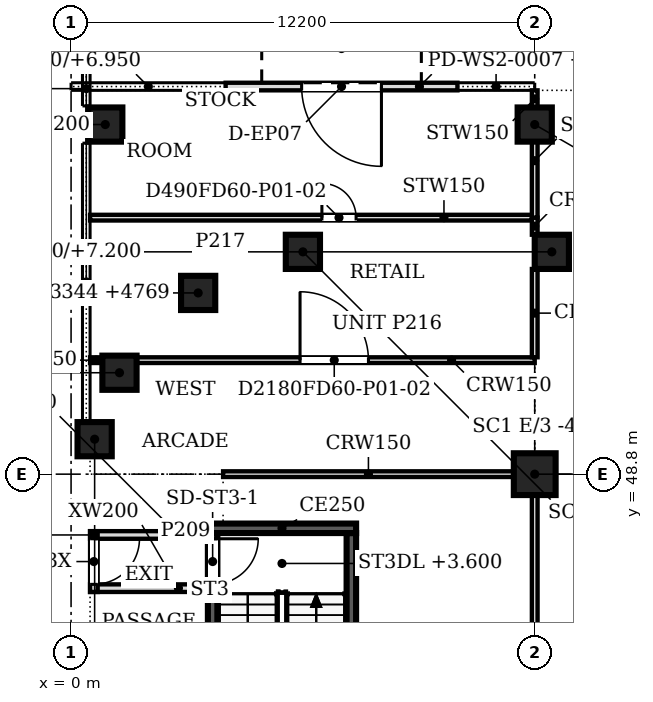
"""IFC4 building model, lengths in metres.
Left out: names, types, materials, properties, quantities, classifications, styles, units other than length and angle.
Written with IfcOpenShell. Run it as: python <this file> out.ifc"""

import sys

from ifc_helpers import new_model, si_unit, direction, frame, frame_2d, origin, origin_2d, place, context, subcontext, project, spatial, polyline, rectangle, outline, extrude, faceted_brep, source, transform, mapped, element, fill, save


model = new_model("IFC4")
c1 = context("Model", 3, precision=1e-05, world=origin(), true_north=direction((0.0, 1.0)))
c2 = subcontext(c1, "Body", "Model", "MODEL_VIEW")
j1 = project(units=[si_unit("LENGTHUNIT", "METRE"), si_unit("PLANEANGLEUNIT", "RADIAN")], contexts=[c1])
p1 = place(None, origin())
s1 = spatial("IfcSite", under=j1, at=p1, CompositionType="ELEMENT")
p2 = place(p1, origin())
s2 = spatial("IfcBuilding", under=s1, at=p2, CompositionType="ELEMENT")
p3 = place(p2, origin())
s3 = spatial("IfcBuildingStorey", under=s2, at=p3, CompositionType="ELEMENT", Elevation=0.0)
p4 = place(p3, frame((12.65, 54.65, 0.0), z_axis=(0.0, 0.0, 1.0), x_axis=(1.0, 0.0, 0.0)))
e1 = element("IfcColumn", 1, at=p4, inside=s3, PredefinedType="COLUMN", context=c2, shape_type="SweptSolid", body=[
    extrude(rectangle(XDim=0.9, YDim=0.9, at=origin_2d()), origin(), (0.0, 0.0, 1.0), 7.2),
])
for number, where, z_axis, x_axis in (
    (2, (6.1, 54.65, 0.0), (0.0, 0.0, 1.0), (1.0, 0.0, 0.0)),
    (3, (3.344, 53.569, 0.0), (0.0, 0.0, 1.0), (1.0, 0.0, 0.0)),
    (4, (1.274, 51.469, 0.0), (0.0, 0.0, 1.0), (1.0, 0.0, 0.0)),
):
    element("IfcColumn", number, at=place(p3, frame(where, z_axis=z_axis, x_axis=x_axis)), inside=s3, PredefinedType="COLUMN", context=c2, shape_type="SweptSolid", body=[
        extrude(rectangle(XDim=0.9, YDim=0.9, at=origin_2d()), origin(), (0.0, 0.0, 1.0), 6.95),
    ])
p5 = place(p3, frame((12.2, 48.8, 0.0), z_axis=(0.0, 0.0, 1.0), x_axis=(1.0, 0.0, 0.0)))
e5 = element("IfcColumn", 5, at=p5, inside=s3, PredefinedType="COLUMN", context=c2, shape_type="SweptSolid", body=[
    extrude(rectangle(XDim=1.1, YDim=1.1, at=origin_2d()), origin(), (0.0, 0.0, 1.0), 6.95),
])
for number, where, z_axis, x_axis in (
    (6, (12.2, 58.0, 0.0), (0.0, 0.0, 1.0), (1.0, 0.0, 0.0)),
    (7, (0.9, 58.0, 0.0), (0.0, 0.0, 1.0), (1.0, 0.0, 0.0)),
    (8, (0.62, 49.72, 0.0), (0.0, 0.0, 1.0), (1.0, 0.0, 0.0)),
):
    element("IfcColumn", number, at=place(p3, frame(where, z_axis=z_axis, x_axis=x_axis)), inside=s3, PredefinedType="COLUMN", context=c2, shape_type="SweptSolid", body=[
        extrude(rectangle(XDim=0.9, YDim=0.9, at=origin_2d()), origin(), (0.0, 0.0, 1.0), 6.95),
    ])
m1 = source(origin(), c2, "Body", "Brep", [
    faceted_brep([(0.0, -0.1, 0.0), (1.472, -0.1, 0.0), (1.472, -0.1, 6.383), (0.019, -0.1, 8.4), (0.0, -0.1, 8.373), (0.037, 0.1, 8.374), (1.472, 0.1, 6.383), (1.472, 0.1, 0.0), (0.037, 0.1, 0.0), (0.019, 0.0, 8.4)], [[[0, 1, 2, 3, 4]], [[5, 6, 7, 8]], [[8, 7, 1, 0]], [[7, 6, 2, 1]], [[6, 5, 9, 3, 2]], [[4, 3, 9]], [[8, 0, 4, 9, 5]]]),
])
p6 = place(p3, frame((0.25, 48.772, 0.0), z_axis=(0.0, 0.0, 1.0), x_axis=(0.0, -1.0, 0.0)))
e9 = element("IfcWall", 9, at=p6, inside=s3, PredefinedType="PARTITIONING", context=c2, shape_type="MappedRepresentation", body=[
    mapped(m1, transform((0.0, 0.0, 0.0), scale=1.0)),
])
m2 = source(origin(), c2, "Body", "SweptSolid", [
    extrude(outline(polyline([(0.219, 0.12), (1.352, 0.12), (1.352, 6.344), (0.219, 7.917), (0.219, 0.12)])), frame((0.0, 0.11, 0.0), z_axis=(0.0, -1.0, 0.0), x_axis=(1.0, 0.0, 0.0)), (0.0, 0.0, 1.0), 0.22),
])
p7 = place(p6, origin())
e10 = element("IfcOpeningElement", 10, at=p7, cuts=e9, PredefinedType="OPENING", context=c2, shape_type="MappedRepresentation", body=[
    mapped(m2, transform((0.0, 0.0, 0.0), scale=1.0)),
])
m3 = source(origin(), c2, "Body", "SweptSolid", [
    extrude(outline(polyline([(0.0, 0.0), (3.0, 0.0), (0.0, 4.163), (0.0, 0.0)])), frame((0.0, 0.1, 0.0), z_axis=(0.0, -1.0, 0.0), x_axis=(1.0, 0.0, 0.0)), (0.0, 0.0, 1.0), 0.2),
])
p8 = place(p3, frame((0.25, 45.7, 0.0), z_axis=(0.0, 0.0, 1.0), x_axis=(0.0, -1.0, 0.0)))
e11 = element("IfcWall", 11, at=p8, inside=s3, PredefinedType="PARTITIONING", context=c2, shape_type="MappedRepresentation", body=[
    mapped(m3, transform((0.0, 0.0, 0.0), scale=1.0)),
])
m4 = source(origin(), c2, "Body", "SweptSolid", [
    extrude(outline(polyline([(0.12, 0.12), (2.766, 0.12), (0.12, 3.791), (0.12, 0.12)])), frame((0.0, 0.11, 0.0), z_axis=(0.0, -1.0, 0.0), x_axis=(1.0, 0.0, 0.0)), (0.0, 0.0, 1.0), 0.22),
])
p9 = place(p8, origin())
e12 = element("IfcOpeningElement", 12, at=p9, cuts=e11, PredefinedType="OPENING", context=c2, shape_type="MappedRepresentation", body=[
    mapped(m4, transform((0.0, 0.0, 0.0), scale=1.0)),
])
m5 = source(origin(), c2, "Body", "SweptSolid", [
    extrude(outline(polyline([(1.6, 0.0), (1.6, 1.563), (0.0, 3.783), (0.0, 0.0), (1.6, 0.0)])), frame((0.0, 0.1, 0.0), z_axis=(0.0, -1.0, 0.0), x_axis=(1.0, 0.0, 0.0)), (0.0, 0.0, 1.0), 0.2),
])
p10 = place(p3, frame((0.25, 47.3, 2.6), z_axis=(0.0, 0.0, 1.0), x_axis=(0.0, -1.0, 0.0)))
e13 = element("IfcWall", 13, at=p10, inside=s3, PredefinedType="PARTITIONING", context=c2, shape_type="MappedRepresentation", body=[
    mapped(m5, transform((0.0, 0.0, 0.0), scale=1.0)),
])
m6 = source(origin(), c2, "Body", "SweptSolid", [
    extrude(outline(polyline([(1.48, 0.12), (1.48, 1.524), (0.12, 3.411), (0.12, 0.12), (1.48, 0.12)])), frame((0.0, 0.11, 0.0), z_axis=(0.0, -1.0, 0.0), x_axis=(1.0, 0.0, 0.0)), (0.0, 0.0, 1.0), 0.22),
])
p11 = place(p10, origin())
e14 = element("IfcOpeningElement", 14, at=p11, cuts=e13, PredefinedType="OPENING", context=c2, shape_type="MappedRepresentation", body=[
    mapped(m6, transform((0.0, 0.0, 0.0), scale=1.0)),
])
m7 = source(origin(), c2, "Body", "Brep", [
    faceted_brep([(0.0, -0.25, 8.4), (6.053, -0.25, 0.0), (6.053, -0.25, 0.851), (0.613, -0.25, 8.4), (0.613, 0.25, 8.4), (6.053, 0.25, 0.851), (6.053, 0.25, 0.0), (0.047, 0.25, 8.335), (0.047, 0.25, 8.4), (0.0, 0.0, 8.4)], [[[0, 1, 2, 3]], [[4, 5, 6, 7, 8]], [[7, 6, 1, 0, 9]], [[5, 4, 3, 2]], [[4, 8, 9, 0, 3]], [[7, 9, 8]], [[1, 6, 5, 2]]]),
])
p12 = place(p3, frame((0.25, 48.753, 0.0), z_axis=(0.0, 0.0, 1.0), x_axis=(0.0, -1.0, 0.0)))
e15 = element("IfcWall", 15, at=p12, inside=s3, PredefinedType="SOLIDWALL", context=c2, shape_type="MappedRepresentation", body=[
    mapped(m7, transform((0.0, 0.0, 0.0), scale=1.0)),
])
p13 = place(p2, frame((0.0, 0.0, 7.2)))
s4 = spatial("IfcBuildingStorey", under=s2, at=p13, CompositionType="ELEMENT", Elevation=7.2)
m8 = source(origin(), c2, "Body", "Brep", [
    faceted_brep([(0.0, -0.25, 0.0), (2.95, -0.25, 0.0), (2.95, -0.25, 16.122), (0.0, -0.25, 16.122), (0.047, 0.25, 16.122), (2.898, 0.25, 16.122), (2.898, 0.25, 0.0), (0.047, 0.25, 0.0), (2.95, 0.0, 0.0), (0.0, 0.0, 0.0), (2.95, 0.0, 16.122), (0.0, 0.0, 16.122)], [[[0, 1, 2, 3]], [[4, 5, 6, 7]], [[7, 6, 8, 1, 0, 9]], [[10, 2, 1, 8]], [[5, 4, 11, 3, 2, 10]], [[9, 0, 3, 11]], [[7, 9, 11, 4]], [[8, 6, 5, 10]]]),
])
p14 = place(p13, frame((6.146, 54.65, -7.2), z_axis=(0.0, 0.0, 1.0), x_axis=(-0.932999673775, -0.359877213415, 0.0)))
e16 = element("IfcWall", 16, at=p14, inside=s4, PredefinedType="SOLIDWALL", context=c2, shape_type="MappedRepresentation", body=[
    mapped(m8, transform((0.0, 0.0, 0.0), scale=1.0)),
])
m9 = source(origin(), c2, "Body", "Brep", [
    faceted_brep([(0.0, -0.25, 0.0), (2.944, -0.25, 0.0), (2.944, -0.25, 16.122), (0.0, -0.25, 16.122), (0.053, 0.25, 16.122), (2.891, 0.25, 16.122), (2.891, 0.25, 0.0), (0.053, 0.25, 0.0), (2.944, 0.0, 0.0), (0.0, 0.0, 0.0), (2.944, 0.0, 16.122), (0.0, 0.0, 16.122)], [[[0, 1, 2, 3]], [[4, 5, 6, 7]], [[7, 6, 8, 1, 0, 9]], [[10, 2, 1, 8]], [[5, 4, 11, 3, 2, 10]], [[9, 0, 3, 11]], [[7, 9, 11, 4]], [[8, 6, 5, 10]]]),
])
p15 = place(p13, frame((3.394, 53.588, -7.2), z_axis=(0.0, 0.0, 1.0), x_axis=(-0.707106781187, -0.707106781187, 0.0)))
e17 = element("IfcWall", 17, at=p15, inside=s4, PredefinedType="SOLIDWALL", context=c2, shape_type="MappedRepresentation", body=[
    mapped(m9, transform((0.0, 0.0, 0.0), scale=1.0)),
])
m10 = source(origin(), c2, "Body", "Brep", [
    faceted_brep([(0.0, -0.25, 0.0), (2.95, -0.25, 0.0), (2.95, -0.25, 16.122), (0.0, -0.25, 16.122), (0.053, 0.25, 16.122), (2.904, 0.25, 16.122), (2.904, 0.25, 0.0), (0.053, 0.25, 0.0), (2.95, 0.0, 0.0), (0.0, 0.0, 0.0), (2.95, 0.0, 16.122), (0.0, 0.0, 16.122)], [[[0, 1, 2, 3]], [[4, 5, 6, 7]], [[7, 6, 8, 1, 0, 9]], [[10, 2, 1, 8]], [[5, 4, 11, 3, 2, 10]], [[9, 0, 3, 11]], [[7, 9, 11, 4]], [[8, 6, 5, 10]]]),
])
p16 = place(p13, frame((1.312, 51.506, -7.2), z_axis=(0.0, 0.0, 1.0), x_axis=(-0.359921456299, -0.932982607178, 0.0)))
e18 = element("IfcWall", 18, at=p16, inside=s4, PredefinedType="SOLIDWALL", context=c2, shape_type="MappedRepresentation", body=[
    mapped(m10, transform((0.0, 0.0, 0.0), scale=1.0)),
])
p17 = place(p3, frame((10.167, 59.0, 0.0), z_axis=(0.0, 0.0, 1.0), x_axis=(-1.0, 0.0, 0.0)))
e19 = element("IfcWall", 19, at=p17, inside=s3, PredefinedType="PARTITIONING", context=c2, shape_type="SweptSolid", body=[
    extrude(rectangle(XDim=6.1, YDim=0.2, at=frame_2d((3.05, 0.0))), origin(), (0.0, 0.0, 1.0), 6.95),
])
m11 = source(origin(), c2, "Body", "SweptSolid", [
    extrude(rectangle(XDim=2.1, YDim=3.0, at=frame_2d((1.05, 1.5))), frame((0.0, 0.11, 0.0), z_axis=(0.0, -1.0, 0.0), x_axis=(1.0, 0.0, 0.0)), (0.0, 0.0, 1.0), 0.22),
])
p18 = place(p17, frame((2.0, 0.0, 0.0)))
e20 = element("IfcOpeningElement", 20, at=p18, cuts=e19, PredefinedType="OPENING", context=c2, shape_type="MappedRepresentation", body=[
    mapped(m11, transform((0.0, 0.0, 0.0), scale=1.0)),
])
m12 = source(origin(), c2, "Body", "SweptSolid", [
    extrude(outline(polyline([(0.12, 0.1), (1.88, 0.1), (1.88, 6.85), (0.12, 6.85), (0.12, 0.1)])), frame((0.0, 0.11, 0.0), z_axis=(0.0, -1.0, 0.0), x_axis=(1.0, 0.0, 0.0)), (0.0, 0.0, 1.0), 0.22),
])
p19 = place(p17, origin())
e21 = element("IfcOpeningElement", 21, at=p19, cuts=e19, PredefinedType="OPENING", context=c2, shape_type="MappedRepresentation", body=[
    mapped(m12, transform((0.0, 0.0, 0.0), scale=1.0)),
])
m13 = source(origin(), c2, "Body", "SweptSolid", [
    extrude(outline(polyline([(4.22, 0.1), (5.98, 0.1), (5.98, 6.85), (4.22, 6.85), (4.22, 0.1)])), frame((0.0, 0.11, 0.0), z_axis=(0.0, -1.0, 0.0), x_axis=(1.0, 0.0, 0.0)), (0.0, 0.0, 1.0), 0.22),
])
p20 = place(p17, origin())
e22 = element("IfcOpeningElement", 22, at=p20, cuts=e19, PredefinedType="OPENING", context=c2, shape_type="MappedRepresentation", body=[
    mapped(m13, transform((0.0, 0.0, 0.0), scale=1.0)),
])
m14 = source(origin(), c2, "Body", "SweptSolid", [
    extrude(outline(polyline([(2.0, 3.12), (4.1, 3.12), (4.1, 6.85), (2.0, 6.85), (2.0, 3.12)])), frame((0.0, 0.11, 0.0), z_axis=(0.0, -1.0, 0.0), x_axis=(1.0, 0.0, 0.0)), (0.0, 0.0, 1.0), 0.22),
])
p21 = place(p17, origin())
e23 = element("IfcOpeningElement", 23, at=p21, cuts=e19, PredefinedType="OPENING", context=c2, shape_type="MappedRepresentation", body=[
    mapped(m14, transform((0.0, 0.0, 0.0), scale=1.0)),
])
p22 = place(p3, frame((3.725, 39.25, 0.0), z_axis=(0.0, 0.0, 1.0), x_axis=(0.0, 1.0, 0.0)))
e24 = element("IfcWall", 24, at=p22, inside=s3, PredefinedType="SOLIDWALL", context=c2, shape_type="SweptSolid", body=[
    extrude(rectangle(XDim=8.0, YDim=0.25, at=frame_2d((4.0, 0.0))), origin(), (0.0, 0.0, 1.0), 7.2),
])
m15 = source(origin(), c2, "Body", "SweptSolid", [
    extrude(rectangle(XDim=1.2, YDim=2.1, at=frame_2d((0.6, 1.05))), frame((0.0, 0.135, 0.0), z_axis=(0.0, -1.0, 0.0), x_axis=(1.0, 0.0, 0.0)), (0.0, 0.0, 1.0), 0.27),
])
p23 = place(p22, frame((6.65, 0.0, 0.0)))
e25 = element("IfcOpeningElement", 25, at=p23, cuts=e24, PredefinedType="OPENING", context=c2, shape_type="MappedRepresentation", body=[
    mapped(m15, transform((0.0, 0.0, 0.0), scale=1.0)),
])
p24 = place(p3, frame((3.6, 47.375, 0.0), z_axis=(0.0, 0.0, 1.0), x_axis=(1.0, 0.0, 0.0)))
e26 = element("IfcWall", 26, at=p24, inside=s3, PredefinedType="SOLIDWALL", context=c2, shape_type="SweptSolid", body=[
    extrude(rectangle(XDim=3.9, YDim=0.25, at=frame_2d((1.95, 0.0))), origin(), (0.0, 0.0, 1.0), 7.2),
])
p25 = place(p3, frame((7.375, 47.25, 0.0), z_axis=(0.0, 0.0, 1.0), x_axis=(0.0, -1.0, 0.0)))
e27 = element("IfcWall", 27, at=p25, inside=s3, PredefinedType="SOLIDWALL", context=c2, shape_type="SweptSolid", body=[
    extrude(rectangle(XDim=8.0, YDim=0.25, at=frame_2d((4.0, 0.0))), origin(), (0.0, 0.0, 1.0), 7.2),
])
for number, where, z_axis, x_axis in (
    (28, (0.5, 45.8, 0.0), (0.0, 0.0, 1.0), (1.0, 0.0, 0.0)),
    (29, (0.5, 47.2, 0.0), (0.0, 0.0, 1.0), (1.0, 0.0, 0.0)),
):
    element("IfcWall", number, at=place(p3, frame(where, z_axis=z_axis, x_axis=x_axis)), inside=s3, PredefinedType="PARTITIONING", context=c2, shape_type="SweptSolid", body=[
        extrude(rectangle(XDim=3.1, YDim=0.2, at=frame_2d((1.55, 0.0))), origin(), (0.0, 0.0, 1.0), 6.115),
    ])
p26 = place(p3, frame((0.6, 45.7, 0.0), z_axis=(0.0, 0.0, 1.0), x_axis=(0.0, 1.0, 0.0)))
e30 = element("IfcWall", 30, at=p26, inside=s3, PredefinedType="PARTITIONING", context=c2, shape_type="SweptSolid", body=[
    extrude(rectangle(XDim=1.6, YDim=0.2, at=frame_2d((0.8, 0.0))), origin(), (0.0, 0.0, 1.0), 6.115),
])
m16 = source(origin(), c2, "Body", "SweptSolid", [
    extrude(rectangle(XDim=1.2, YDim=2.1, at=frame_2d((0.6, 1.05))), frame((0.0, 0.11, 0.0), z_axis=(0.0, -1.0, 0.0), x_axis=(1.0, 0.0, 0.0)), (0.0, 0.0, 1.0), 0.22),
])
p27 = place(p26, frame((0.2, 0.0, 0.0)))
e31 = element("IfcOpeningElement", 31, at=p27, cuts=e30, PredefinedType="OPENING", context=c2, shape_type="MappedRepresentation", body=[
    mapped(m16, transform((0.0, 0.0, 0.0), scale=1.0)),
])
p28 = place(p3, frame((12.2, 37.151, 0.0), z_axis=(0.0, 0.0, 1.0), x_axis=(0.0, 1.0, 0.0)))
e32 = element("IfcWall", 32, at=p28, inside=s3, PredefinedType="PARTITIONING", context=c2, shape_type="SweptSolid", body=[
    extrude(rectangle(XDim=11.098, YDim=0.15, at=frame_2d((5.549, 0.0))), origin(), (0.0, 0.0, 1.0), 6.115),
])
m17 = source(origin(), c2, "Body", "SweptSolid", [
    extrude(rectangle(XDim=1.0, YDim=2.1, at=frame_2d((0.5, 1.05))), frame((0.0, 0.085, 0.0), z_axis=(0.0, -1.0, 0.0), x_axis=(1.0, 0.0, 0.0)), (0.0, 0.0, 1.0), 0.17),
])
p29 = place(p28, frame((5.45, 0.0, 0.0)))
e33 = element("IfcOpeningElement", 33, at=p29, cuts=e32, PredefinedType="OPENING", context=c2, shape_type="MappedRepresentation", body=[
    mapped(m17, transform((0.0, 0.0, 0.0), scale=1.0)),
])
p30 = place(p3, frame((4.0, 48.8, 0.0), z_axis=(0.0, 0.0, 1.0), x_axis=(1.0, 0.0, 0.0)))
e34 = element("IfcWall", 34, at=p30, inside=s3, PredefinedType="PARTITIONING", context=c2, shape_type="SweptSolid", body=[
    extrude(rectangle(XDim=7.649, YDim=0.15, at=frame_2d((3.824, 0.0))), origin(), (0.0, 0.0, 1.0), 6.115),
])
p31 = place(p3, frame((0.5, 51.8, 0.0), z_axis=(0.0, 0.0, 1.0), x_axis=(1.0, 0.0, 0.0)))
e35 = element("IfcWall", 35, at=p31, inside=s3, PredefinedType="PARTITIONING", context=c2, shape_type="SweptSolid", body=[
    extrude(rectangle(XDim=0.323, YDim=0.15, at=frame_2d((0.162, 0.0))), origin(), (0.0, 0.0, 1.0), 6.115),
])
p32 = place(p3, frame((1.725, 51.8, 0.0), z_axis=(0.0, 0.0, 1.0), x_axis=(1.0, 0.0, 0.0)))
e36 = element("IfcWall", 36, at=p32, inside=s3, PredefinedType="PARTITIONING", context=c2, shape_type="SweptSolid", body=[
    extrude(rectangle(XDim=10.475, YDim=0.15, at=frame_2d((5.237, 0.0))), origin(), (0.0, 0.0, 1.0), 6.115),
])
m18 = source(origin(), c2, "Body", "SweptSolid", [
    extrude(rectangle(XDim=1.8, YDim=2.1, at=frame_2d((0.9, 1.05))), frame((0.0, 0.085, 0.0), z_axis=(0.0, -1.0, 0.0), x_axis=(1.0, 0.0, 0.0)), (0.0, 0.0, 1.0), 0.17),
])
p33 = place(p32, frame((4.3, 0.0, 0.0)))
e37 = element("IfcOpeningElement", 37, at=p33, cuts=e36, PredefinedType="OPENING", context=c2, shape_type="MappedRepresentation", body=[
    mapped(m18, transform((0.0, 0.0, 0.0), scale=1.0)),
])
p34 = place(p3, frame((12.2, 51.876, 0.0), z_axis=(0.0, 0.0, 1.0), x_axis=(0.0, 1.0, 0.0)))
e38 = element("IfcWall", 38, at=p34, inside=s3, PredefinedType="PARTITIONING", context=c2, shape_type="SweptSolid", body=[
    extrude(rectangle(XDim=2.323, YDim=0.15, at=frame_2d((1.162, 0.0))), origin(), (0.0, 0.0, 1.0), 6.115),
])
p35 = place(p3, frame((12.2, 55.101, 0.0), z_axis=(0.0, 0.0, 1.0), x_axis=(0.0, 1.0, 0.0)))
e39 = element("IfcWall", 39, at=p35, inside=s3, PredefinedType="PARTITIONING", context=c2, shape_type="SweptSolid", body=[
    extrude(rectangle(XDim=0.449, YDim=0.15, at=frame_2d((0.225, 0.0))), origin(), (0.0, 0.0, 1.0), 6.115),
])
p36 = place(p3, frame((0.5, 55.55, 0.0), z_axis=(0.0, 0.0, 1.0), x_axis=(1.0, 0.0, 0.0)))
e40 = element("IfcWall", 40, at=p36, inside=s3, PredefinedType="PARTITIONING", context=c2, shape_type="SweptSolid", body=[
    extrude(rectangle(XDim=11.624, YDim=0.15, at=frame_2d((5.812, 0.0))), origin(), (0.0, 0.0, 1.0), 6.115),
])
m19 = source(origin(), c2, "Body", "SweptSolid", [
    extrude(rectangle(XDim=0.9, YDim=2.1, at=frame_2d((0.45, 1.05))), frame((0.0, 0.085, 0.0), z_axis=(0.0, -1.0, 0.0), x_axis=(1.0, 0.0, 0.0)), (0.0, 0.0, 1.0), 0.17),
])
p37 = place(p36, frame((6.1, 0.0, 0.0)))
e41 = element("IfcOpeningElement", 41, at=p37, cuts=e40, PredefinedType="OPENING", context=c2, shape_type="MappedRepresentation", body=[
    mapped(m19, transform((0.0, 0.0, 0.0), scale=1.0)),
])
p38 = place(p3, frame((12.2, 55.551, 0.0), z_axis=(0.0, 0.0, 1.0), x_axis=(0.0, 1.0, 0.0)))
e42 = element("IfcWall", 42, at=p38, inside=s3, PredefinedType="PARTITIONING", context=c2, shape_type="SweptSolid", body=[
    extrude(rectangle(XDim=1.998, YDim=0.15, at=frame_2d((0.999, 0.0))), origin(), (0.0, 0.0, 1.0), 6.115),
])
p39 = place(p3, frame((12.2, 58.451, 0.0), z_axis=(0.0, 0.0, 1.0), x_axis=(0.0, 1.0, 0.0)))
e43 = element("IfcWall", 43, at=p39, inside=s3, PredefinedType="PARTITIONING", context=c2, shape_type="SweptSolid", body=[
    extrude(rectangle(XDim=0.449, YDim=0.15, at=frame_2d((0.225, 0.0))), origin(), (0.0, 0.0, 1.0), 6.115),
])
m20 = source(origin(), c2, "Body", "SweptSolid", [
    extrude(rectangle(XDim=2.1, YDim=3.0, at=frame_2d((1.05, 1.5))), frame((0.0, 0.025, 0.0), z_axis=(0.0, -1.0, 0.0), x_axis=(1.0, 0.0, 0.0)), (0.0, 0.0, 1.0), 0.05),
])
p40 = place(p18, origin())
e44 = element("IfcDoor", 44, at=p40, inside=s3, OperationType="DOUBLE_DOOR_SINGLE_SWING", PredefinedType="DOOR", context=c2, shape_type="MappedRepresentation", body=[
    mapped(m20, transform((0.0, 0.0, 0.0), scale=1.0)),
])
fill(e20, e44)
m21 = source(origin(), c2, "Body", "SweptSolid", [
    extrude(rectangle(XDim=1.2, YDim=2.1, at=frame_2d((0.6, 1.05))), frame((0.0, 0.025, 0.0), z_axis=(0.0, -1.0, 0.0), x_axis=(1.0, 0.0, 0.0)), (0.0, 0.0, 1.0), 0.05),
])
p41 = place(p23, origin())
e45 = element("IfcDoor", 45, at=p41, inside=s3, OperationType="SINGLE_SWING_RIGHT", PredefinedType="DOOR", context=c2, shape_type="MappedRepresentation", body=[
    mapped(m21, transform((0.0, 0.0, 0.0), scale=1.0)),
])
fill(e25, e45)
p42 = place(p27, origin())
e46 = element("IfcDoor", 46, at=p42, inside=s3, OperationType="SINGLE_SWING_RIGHT", PredefinedType="DOOR", context=c2, shape_type="MappedRepresentation", body=[
    mapped(m21, transform((0.0, 0.0, 0.0), scale=1.0)),
])
fill(e31, e46)
m22 = source(origin(), c2, "Body", "SweptSolid", [
    extrude(rectangle(XDim=1.8, YDim=2.1, at=frame_2d((0.9, 1.05))), frame((0.0, 0.025, 0.0), z_axis=(0.0, -1.0, 0.0), x_axis=(1.0, 0.0, 0.0)), (0.0, 0.0, 1.0), 0.05),
])
p43 = place(p33, origin())
e47 = element("IfcDoor", 47, at=p43, inside=s3, OperationType="DOUBLE_DOOR_SINGLE_SWING", PredefinedType="DOOR", context=c2, shape_type="MappedRepresentation", body=[
    mapped(m22, transform((0.0, 0.0, 0.0), scale=1.0)),
])
fill(e37, e47)
m23 = source(origin(), c2, "Body", "SweptSolid", [
    extrude(rectangle(XDim=0.9, YDim=2.1, at=frame_2d((0.45, 1.05))), frame((0.0, 0.025, 0.0), z_axis=(0.0, -1.0, 0.0), x_axis=(1.0, 0.0, 0.0)), (0.0, 0.0, 1.0), 0.05),
])
p44 = place(p37, origin())
e48 = element("IfcDoor", 48, at=p44, inside=s3, OperationType="SINGLE_SWING_LEFT", PredefinedType="DOOR", context=c2, shape_type="MappedRepresentation", body=[
    mapped(m23, transform((0.0, 0.0, 0.0), scale=1.0)),
])
fill(e41, e48)
save(model, sys.argv[1])
